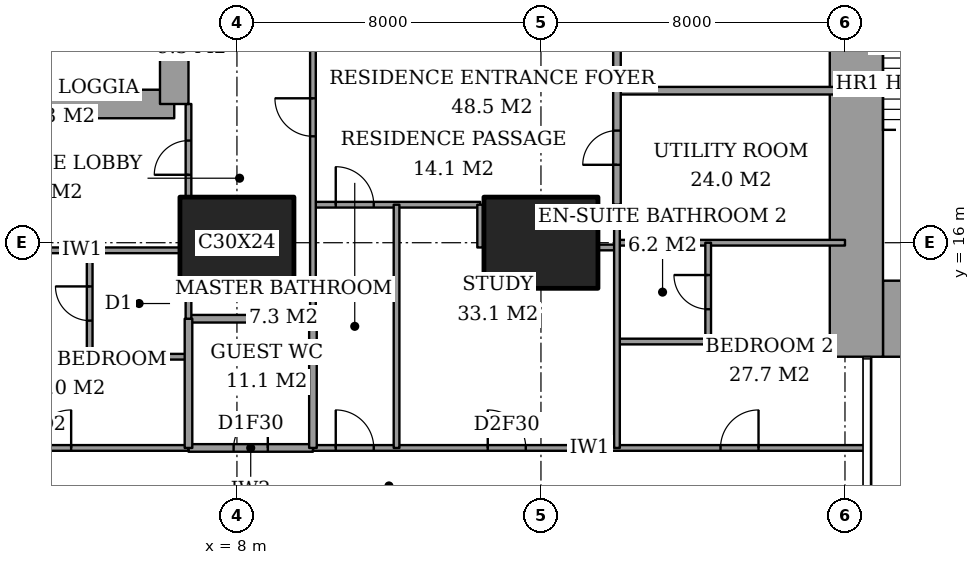
"""IFC4 building model, lengths in metres.
Left out: names, types, materials, properties, quantities, classifications, styles, units other than length and angle.
Written with IfcOpenShell. Run it as: python <this file> out.ifc"""

import sys

from ifc_helpers import new_model, si_unit, direction, frame, frame_2d, origin, origin_2d, place, context, subcontext, project, spatial, rectangle, extrude, element, fill, save


model = new_model("IFC4")
c1 = context("Model", 3, precision=1e-05, world=origin(), true_north=direction((0.0, 1.0)))
c2 = subcontext(c1, "Body", "Model", "MODEL_VIEW")
j1 = project(units=[si_unit("LENGTHUNIT", "METRE"), si_unit("PLANEANGLEUNIT", "RADIAN")], contexts=[c1])
p1 = place(None, origin())
s1 = spatial("IfcSite", under=j1, at=p1, CompositionType="ELEMENT")
p2 = place(p1, origin())
s2 = spatial("IfcBuilding", under=s1, at=p2, CompositionType="ELEMENT")
p3 = place(p2, frame((0.0, 0.0, 157.4)))
s3 = spatial("IfcBuildingStorey", under=s2, at=p3, CompositionType="ELEMENT", Elevation=157.4)
for number, where, z_axis, x_axis in (
    (1, (8.0, 16.0, 0.0), (0.0, 0.0, 1.0), (1.0, 0.0, 0.0)),
    (2, (16.0, 16.0, 0.0), (0.0, 0.0, 1.0), (1.0, 0.0, 0.0)),
):
    element("IfcColumn", number, at=place(p3, frame(where, z_axis=z_axis, x_axis=x_axis)), inside=s3, PredefinedType="COLUMN", context=c2, shape_type="SweptSolid", body=[
        extrude(rectangle(XDim=3.0, YDim=2.4, at=origin_2d()), origin(), (0.0, 0.0, 1.0), 3.6),
    ])
p4 = place(p3, frame((25.0, 14.0, 0.0), z_axis=(0.0, 0.0, 1.0), x_axis=(1.0, 0.0, 0.0)))
e3 = element("IfcWall", 3, at=p4, inside=s3, PredefinedType="SHEAR", context=c2, shape_type="SweptSolid", body=[
    extrude(rectangle(XDim=3.15, YDim=2.0, at=frame_2d((1.575, 0.0))), origin(), (0.0, 0.0, 1.0), 3.6),
])
p5 = place(p3, frame((24.3, 13.0, 0.0), z_axis=(0.0, 0.0, 1.0), x_axis=(0.0, 1.0, 0.0)))
e4 = element("IfcWall", 4, at=p5, inside=s3, PredefinedType="SHEAR", context=c2, shape_type="SweptSolid", body=[
    extrude(rectangle(XDim=10.15, YDim=1.4, at=frame_2d((5.075, 0.0))), origin(), (0.0, 0.0, 1.0), 3.6),
])
p6 = place(p3, frame((1.9, 19.65, 0.0), z_axis=(0.0, 0.0, 1.0), x_axis=(1.0, 0.0, 0.0)))
e5 = element("IfcWall", 5, at=p6, inside=s3, PredefinedType="SHEAR", context=c2, shape_type="SweptSolid", body=[
    extrude(rectangle(XDim=4.45, YDim=0.75, at=frame_2d((2.225, 0.0))), origin(), (0.0, 0.0, 1.0), 3.6),
])
p7 = place(p3, frame((6.35, 19.65, 0.0), z_axis=(0.0, 0.0, 1.0), x_axis=(0.0, 1.0, 0.0)))
e6 = element("IfcWall", 6, at=p7, inside=s3, PredefinedType="SHEAR", context=c2, shape_type="SweptSolid", body=[
    extrude(rectangle(XDim=8.7, YDim=0.75, at=frame_2d((4.35, 0.0))), origin(), (0.0, 0.0, 1.0), 3.6),
])
p8 = place(p7, frame((6.725, 0.0, 0.0)))
e7 = element("IfcOpeningElement", 7, at=p8, cuts=e6, PredefinedType="OPENING", context=c2, shape_type="SweptSolid", body=[
    extrude(rectangle(XDim=1.0, YDim=2.1, at=frame_2d((0.5, 1.05))), frame((0.0, 0.385, 0.0), z_axis=(0.0, -1.0, 0.0), x_axis=(1.0, 0.0, 0.0)), (0.0, 0.0, 1.0), 0.77),
])
p9 = place(p3, frame((6.725, 10.6, 0.0), z_axis=(0.0, 0.0, 1.0), x_axis=(1.0, 0.0, 0.0)))
e8 = element("IfcWall", 8, at=p9, inside=s3, PredefinedType="PARTITIONING", context=c2, shape_type="SweptSolid", body=[
    extrude(rectangle(XDim=3.275, YDim=0.2, at=frame_2d((1.637, 0.0))), origin(), (0.0, 0.0, 1.0), 3.35),
])
p10 = place(p9, frame((1.188, 0.0, 0.0)))
e9 = element("IfcOpeningElement", 9, at=p10, cuts=e8, PredefinedType="OPENING", context=c2, shape_type="SweptSolid", body=[
    extrude(rectangle(XDim=0.9, YDim=2.1, at=frame_2d((0.45, 1.05))), frame((0.0, 0.11, 0.0), z_axis=(0.0, -1.0, 0.0), x_axis=(1.0, 0.0, 0.0)), (0.0, 0.0, 1.0), 0.22),
])
p11 = place(p3, frame((-0.45, 10.6, 0.0), z_axis=(0.0, 0.0, 1.0), x_axis=(1.0, 0.0, 0.0)))
e10 = element("IfcWall", 10, at=p11, inside=s3, PredefinedType="PARTITIONING", context=c2, shape_type="SweptSolid", body=[
    extrude(rectangle(XDim=7.175, YDim=0.15, at=frame_2d((3.587, 0.0))), origin(), (0.0, 0.0, 1.0), 3.35),
])
p12 = place(p11, frame((3.087, 0.0, 0.0)))
e11 = element("IfcOpeningElement", 11, at=p12, cuts=e10, PredefinedType="OPENING", context=c2, shape_type="SweptSolid", body=[
    extrude(rectangle(XDim=1.0, YDim=2.1, at=frame_2d((0.5, 1.05))), frame((0.0, 0.085, 0.0), z_axis=(0.0, -1.0, 0.0), x_axis=(1.0, 0.0, 0.0)), (0.0, 0.0, 1.0), 0.17),
])
p13 = place(p3, frame((10.0, 10.6, 0.0), z_axis=(0.0, 0.0, 1.0), x_axis=(1.0, 0.0, 0.0)))
e12 = element("IfcWall", 12, at=p13, inside=s3, PredefinedType="PARTITIONING", context=c2, shape_type="SweptSolid", body=[
    extrude(rectangle(XDim=14.561, YDim=0.15, at=frame_2d((7.281, 0.0))), origin(), (0.0, 0.0, 1.0), 3.35),
])
p14 = place(p13, frame((0.6, 0.0, 0.0)))
e13 = element("IfcOpeningElement", 13, at=p14, cuts=e12, PredefinedType="OPENING", context=c2, shape_type="SweptSolid", body=[
    extrude(rectangle(XDim=1.0, YDim=2.1, at=frame_2d((0.5, 1.05))), frame((0.0, 0.085, 0.0), z_axis=(0.0, -1.0, 0.0), x_axis=(1.0, 0.0, 0.0)), (0.0, 0.0, 1.0), 0.17),
])
p15 = place(p13, frame((4.6, 0.0, 0.0)))
e14 = element("IfcOpeningElement", 14, at=p15, cuts=e12, PredefinedType="OPENING", context=c2, shape_type="SweptSolid", body=[
    extrude(rectangle(XDim=1.0, YDim=2.1, at=frame_2d((0.5, 1.05))), frame((0.0, 0.085, 0.0), z_axis=(0.0, -1.0, 0.0), x_axis=(1.0, 0.0, 0.0)), (0.0, 0.0, 1.0), 0.17),
])
p16 = place(p13, frame((10.725, 0.0, 0.0)))
e15 = element("IfcOpeningElement", 15, at=p16, cuts=e12, PredefinedType="OPENING", context=c2, shape_type="SweptSolid", body=[
    extrude(rectangle(XDim=1.0, YDim=2.1, at=frame_2d((0.5, 1.05))), frame((0.0, 0.085, 0.0), z_axis=(0.0, -1.0, 0.0), x_axis=(1.0, 0.0, 0.0)), (0.0, 0.0, 1.0), 0.17),
])
p17 = place(p3, frame((4.125, 13.0, 0.0), z_axis=(0.0, 0.0, 1.0), x_axis=(1.0, 0.0, 0.0)))
e16 = element("IfcWall", 16, at=p17, inside=s3, PredefinedType="PARTITIONING", context=c2, shape_type="SweptSolid", body=[
    extrude(rectangle(XDim=2.6, YDim=0.15, at=frame_2d((1.3, 0.0))), origin(), (0.0, 0.0, 1.0), 3.35),
])
p18 = place(p3, frame((18.0, 13.4, 0.0), z_axis=(0.0, 0.0, 1.0), x_axis=(1.0, 0.0, 0.0)))
e17 = element("IfcWall", 17, at=p18, inside=s3, PredefinedType="PARTITIONING", context=c2, shape_type="SweptSolid", body=[
    extrude(rectangle(XDim=2.4, YDim=0.15, at=frame_2d((1.2, 0.0))), origin(), (0.0, 0.0, 1.0), 3.35),
])
p19 = place(p3, frame((6.725, 14.0, 0.0), z_axis=(0.0, 0.0, 1.0), x_axis=(1.0, 0.0, 0.0)))
e18 = element("IfcWall", 18, at=p19, inside=s3, PredefinedType="PARTITIONING", context=c2, shape_type="SweptSolid", body=[
    extrude(rectangle(XDim=3.275, YDim=0.2, at=frame_2d((1.637, 0.0))), origin(), (0.0, 0.0, 1.0), 3.35),
])
p20 = place(p3, frame((1.35, 15.8, 0.0), z_axis=(0.0, 0.0, 1.0), x_axis=(1.0, 0.0, 0.0)))
e19 = element("IfcWall", 19, at=p20, inside=s3, PredefinedType="PARTITIONING", context=c2, shape_type="SweptSolid", body=[
    extrude(rectangle(XDim=5.15, YDim=0.15, at=frame_2d((2.575, 0.0))), origin(), (0.0, 0.0, 1.0), 3.35),
])
p21 = place(p3, frame((17.5, 15.875, 0.0), z_axis=(0.0, 0.0, 1.0), x_axis=(1.0, 0.0, 0.0)))
e20 = element("IfcWall", 20, at=p21, inside=s3, PredefinedType="PARTITIONING", context=c2, shape_type="SweptSolid", body=[
    extrude(rectangle(XDim=0.5, YDim=0.15, at=frame_2d((0.25, 0.0))), origin(), (0.0, 0.0, 1.0), 2.634),
])
p22 = place(p3, frame((18.0, 16.0, 0.0), z_axis=(0.0, 0.0, 1.0), x_axis=(1.0, 0.0, 0.0)))
e21 = element("IfcWall", 21, at=p22, inside=s3, PredefinedType="PARTITIONING", context=c2, shape_type="SweptSolid", body=[
    extrude(rectangle(XDim=6.0, YDim=0.15, at=frame_2d((3.0, 0.0))), origin(), (0.0, 0.0, 1.0), 2.634),
])
p23 = place(p3, frame((10.0, 17.0, 0.0), z_axis=(0.0, 0.0, 1.0), x_axis=(1.0, 0.0, 0.0)))
e22 = element("IfcWall", 22, at=p23, inside=s3, PredefinedType="PARTITIONING", context=c2, shape_type="SweptSolid", body=[
    extrude(rectangle(XDim=4.4, YDim=0.15, at=frame_2d((2.2, 0.0))), origin(), (0.0, 0.0, 1.0), 3.35),
])
p24 = place(p23, frame((0.6, 0.0, 0.0)))
e23 = element("IfcOpeningElement", 23, at=p24, cuts=e22, PredefinedType="OPENING", context=c2, shape_type="SweptSolid", body=[
    extrude(rectangle(XDim=1.0, YDim=2.1, at=frame_2d((0.5, 1.05))), frame((0.0, 0.085, 0.0), z_axis=(0.0, -1.0, 0.0), x_axis=(1.0, 0.0, 0.0)), (0.0, 0.0, 1.0), 0.17),
])
p25 = place(p3, frame((18.0, 20.0, 0.0), z_axis=(0.0, 0.0, 1.0), x_axis=(1.0, 0.0, 0.0)))
e24 = element("IfcWall", 24, at=p25, inside=s3, PredefinedType="PARTITIONING", context=c2, shape_type="SweptSolid", body=[
    extrude(rectangle(XDim=6.0, YDim=0.2, at=frame_2d((3.0, 0.0))), origin(), (0.0, 0.0, 1.0), 3.35),
])
p26 = place(p3, frame((4.125, 13.0, 0.0), z_axis=(0.0, 0.0, 1.0), x_axis=(0.0, 1.0, 0.0)))
e25 = element("IfcWall", 25, at=p26, inside=s3, PredefinedType="PARTITIONING", context=c2, shape_type="SweptSolid", body=[
    extrude(rectangle(XDim=2.8, YDim=0.15, at=frame_2d((1.4, 0.0))), origin(), (0.0, 0.0, 1.0), 3.35),
])
p27 = place(p26, frame((0.95, 0.0, 0.0)))
e26 = element("IfcOpeningElement", 26, at=p27, cuts=e25, PredefinedType="OPENING", context=c2, shape_type="SweptSolid", body=[
    extrude(rectangle(XDim=0.9, YDim=2.1, at=frame_2d((0.45, 1.05))), frame((0.0, 0.085, 0.0), z_axis=(0.0, -1.0, 0.0), x_axis=(1.0, 0.0, 0.0)), (0.0, 0.0, 1.0), 0.17),
])
p28 = place(p3, frame((6.725, 10.6, 0.0), z_axis=(0.0, 0.0, 1.0), x_axis=(0.0, 1.0, 0.0)))
e27 = element("IfcWall", 27, at=p28, inside=s3, PredefinedType="PARTITIONING", context=c2, shape_type="SweptSolid", body=[
    extrude(rectangle(XDim=3.4, YDim=0.2, at=frame_2d((1.7, 0.0))), origin(), (0.0, 0.0, 1.0), 3.35),
])
p29 = place(p3, frame((6.725, 14.0, 0.0), z_axis=(0.0, 0.0, 1.0), x_axis=(0.0, 1.0, 0.0)))
e28 = element("IfcWall", 28, at=p29, inside=s3, PredefinedType="PARTITIONING", context=c2, shape_type="SweptSolid", body=[
    extrude(rectangle(XDim=0.8, YDim=0.15, at=frame_2d((0.4, 0.0))), origin(), (0.0, 0.0, 1.0), 3.35),
])
p30 = place(p3, frame((6.725, 17.2, 0.0), z_axis=(0.0, 0.0, 1.0), x_axis=(0.0, 1.0, 0.0)))
e29 = element("IfcWall", 29, at=p30, inside=s3, PredefinedType="PARTITIONING", context=c2, shape_type="SweptSolid", body=[
    extrude(rectangle(XDim=2.45, YDim=0.15, at=frame_2d((1.225, 0.0))), origin(), (0.0, 0.0, 1.0), 3.35),
])
p31 = place(p30, frame((0.587, 0.0, 0.0)))
e30 = element("IfcOpeningElement", 30, at=p31, cuts=e29, PredefinedType="OPENING", context=c2, shape_type="SweptSolid", body=[
    extrude(rectangle(XDim=0.9, YDim=2.1, at=frame_2d((0.45, 1.05))), frame((0.0, 0.085, 0.0), z_axis=(0.0, -1.0, 0.0), x_axis=(1.0, 0.0, 0.0)), (0.0, 0.0, 1.0), 0.17),
])
p32 = place(p3, frame((10.0, 10.6, 0.0), z_axis=(0.0, 0.0, 1.0), x_axis=(0.0, 1.0, 0.0)))
e31 = element("IfcWall", 31, at=p32, inside=s3, PredefinedType="PARTITIONING", context=c2, shape_type="SweptSolid", body=[
    extrude(rectangle(XDim=3.4, YDim=0.2, at=frame_2d((1.7, 0.0))), origin(), (0.0, 0.0, 1.0), 3.35),
])
p33 = place(p3, frame((10.0, 14.0, 0.0), z_axis=(0.0, 0.0, 1.0), x_axis=(0.0, 1.0, 0.0)))
e32 = element("IfcWall", 32, at=p33, inside=s3, PredefinedType="PARTITIONING", context=c2, shape_type="SweptSolid", body=[
    extrude(rectangle(XDim=7.6, YDim=0.15, at=frame_2d((3.8, 0.0))), origin(), (0.0, 0.0, 1.0), 3.35),
])
p34 = place(p33, frame((4.8, 0.0, 0.0)))
e33 = element("IfcOpeningElement", 33, at=p34, cuts=e32, PredefinedType="OPENING", context=c2, shape_type="SweptSolid", body=[
    extrude(rectangle(XDim=1.0, YDim=2.1, at=frame_2d((0.5, 1.05))), frame((0.0, 0.085, 0.0), z_axis=(0.0, -1.0, 0.0), x_axis=(1.0, 0.0, 0.0)), (0.0, 0.0, 1.0), 0.17),
])
p35 = place(p3, frame((12.2, 10.6, 0.0), z_axis=(0.0, 0.0, 1.0), x_axis=(0.0, 1.0, 0.0)))
e34 = element("IfcWall", 34, at=p35, inside=s3, PredefinedType="PARTITIONING", context=c2, shape_type="SweptSolid", body=[
    extrude(rectangle(XDim=6.4, YDim=0.15, at=frame_2d((3.2, 0.0))), origin(), (0.0, 0.0, 1.0), 3.35),
])
p36 = place(p3, frame((14.4, 15.875, 0.0), z_axis=(0.0, 0.0, 1.0), x_axis=(0.0, 1.0, 0.0)))
e35 = element("IfcWall", 35, at=p36, inside=s3, PredefinedType="PARTITIONING", context=c2, shape_type="SweptSolid", body=[
    extrude(rectangle(XDim=1.125, YDim=0.15, at=frame_2d((0.562, 0.0))), origin(), (0.0, 0.0, 1.0), 3.35),
])
p37 = place(p3, frame((18.0, 17.0, 0.0), z_axis=(0.0, 0.0, 1.0), x_axis=(0.0, 1.0, 0.0)))
e36 = element("IfcWall", 36, at=p37, inside=s3, PredefinedType="PARTITIONING", context=c2, shape_type="SweptSolid", body=[
    extrude(rectangle(XDim=7.0, YDim=0.2, at=frame_2d((3.5, 0.0))), origin(), (0.0, 0.0, 1.0), 3.35),
])
p38 = place(p37, frame((4.4, 0.0, 0.0)))
e37 = element("IfcOpeningElement", 37, at=p38, cuts=e36, PredefinedType="OPENING", context=c2, shape_type="SweptSolid", body=[
    extrude(rectangle(XDim=1.2, YDim=2.4, at=frame_2d((0.6, 1.2))), frame((0.0, 0.11, 0.0), z_axis=(0.0, -1.0, 0.0), x_axis=(1.0, 0.0, 0.0)), (0.0, 0.0, 1.0), 0.22),
])
p39 = place(p37, frame((1.05, 0.0, 0.0)))
e38 = element("IfcOpeningElement", 38, at=p39, cuts=e36, PredefinedType="OPENING", context=c2, shape_type="SweptSolid", body=[
    extrude(rectangle(XDim=0.9, YDim=2.1, at=frame_2d((0.45, 1.05))), frame((0.0, 0.11, 0.0), z_axis=(0.0, -1.0, 0.0), x_axis=(1.0, 0.0, 0.0)), (0.0, 0.0, 1.0), 0.22),
])
p40 = place(p3, frame((18.0, 10.6, 0.0), z_axis=(0.0, 0.0, 1.0), x_axis=(0.0, 1.0, 0.0)))
e39 = element("IfcWall", 39, at=p40, inside=s3, PredefinedType="PARTITIONING", context=c2, shape_type="SweptSolid", body=[
    extrude(rectangle(XDim=6.4, YDim=0.15, at=frame_2d((3.2, 0.0))), origin(), (0.0, 0.0, 1.0), 3.35),
])
p41 = place(p3, frame((20.4, 13.4, 0.0), z_axis=(0.0, 0.0, 1.0), x_axis=(0.0, 1.0, 0.0)))
e40 = element("IfcWall", 40, at=p41, inside=s3, PredefinedType="PARTITIONING", context=c2, shape_type="SweptSolid", body=[
    extrude(rectangle(XDim=2.6, YDim=0.15, at=frame_2d((1.3, 0.0))), origin(), (0.0, 0.0, 1.0), 3.35),
])
p42 = place(p41, frame((0.85, 0.0, 0.0)))
e41 = element("IfcOpeningElement", 41, at=p42, cuts=e40, PredefinedType="OPENING", context=c2, shape_type="SweptSolid", body=[
    extrude(rectangle(XDim=0.9, YDim=2.1, at=frame_2d((0.45, 1.05))), frame((0.0, 0.085, 0.0), z_axis=(0.0, -1.0, 0.0), x_axis=(1.0, 0.0, 0.0)), (0.0, 0.0, 1.0), 0.17),
])
p43 = place(p14, origin())
e42 = element("IfcDoor", 42, at=p43, inside=s3, OperationType="SINGLE_SWING_RIGHT", PredefinedType="DOOR", context=c2, shape_type="SweptSolid", body=[
    extrude(rectangle(XDim=1.0, YDim=2.1, at=frame_2d((0.5, 1.05))), frame((0.0, 0.025, 0.0), z_axis=(0.0, -1.0, 0.0), x_axis=(1.0, 0.0, 0.0)), (0.0, 0.0, 1.0), 0.05),
])
fill(e13, e42)
p44 = place(p27, origin())
e43 = element("IfcDoor", 43, at=p44, inside=s3, OperationType="SINGLE_SWING_LEFT", PredefinedType="DOOR", context=c2, shape_type="SweptSolid", body=[
    extrude(rectangle(XDim=0.9, YDim=2.1, at=frame_2d((0.45, 1.05))), frame((0.0, 0.025, 0.0), z_axis=(0.0, -1.0, 0.0), x_axis=(1.0, 0.0, 0.0)), (0.0, 0.0, 1.0), 0.05),
])
fill(e26, e43)
p45 = place(p12, origin())
e44 = element("IfcDoor", 44, at=p45, inside=s3, OperationType="SINGLE_SWING_LEFT", PredefinedType="DOOR", context=c2, shape_type="SweptSolid", body=[
    extrude(rectangle(XDim=1.0, YDim=2.1, at=frame_2d((0.5, 1.05))), frame((0.0, 0.025, 0.0), z_axis=(0.0, -1.0, 0.0), x_axis=(1.0, 0.0, 0.0)), (0.0, 0.0, 1.0), 0.05),
])
fill(e11, e44)
p46 = place(p31, origin())
e45 = element("IfcDoor", 45, at=p46, inside=s3, OperationType="SINGLE_SWING_RIGHT", PredefinedType="DOOR", context=c2, shape_type="SweptSolid", body=[
    extrude(rectangle(XDim=0.9, YDim=2.1, at=frame_2d((0.45, 1.05))), frame((0.0, 0.025, 0.0), z_axis=(0.0, -1.0, 0.0), x_axis=(1.0, 0.0, 0.0)), (0.0, 0.0, 1.0), 0.05),
])
fill(e30, e45)
p47 = place(p10, origin())
e46 = element("IfcDoor", 46, at=p47, inside=s3, OperationType="SINGLE_SWING_LEFT", PredefinedType="DOOR", context=c2, shape_type="SweptSolid", body=[
    extrude(rectangle(XDim=0.9, YDim=2.1, at=frame_2d((0.45, 1.05))), frame((0.0, 0.025, 0.0), z_axis=(0.0, -1.0, 0.0), x_axis=(1.0, 0.0, 0.0)), (0.0, 0.0, 1.0), 0.05),
])
fill(e9, e46)
p48 = place(p34, origin())
e47 = element("IfcDoor", 47, at=p48, inside=s3, OperationType="SINGLE_SWING_LEFT", PredefinedType="DOOR", context=c2, shape_type="SweptSolid", body=[
    extrude(rectangle(XDim=1.0, YDim=2.1, at=frame_2d((0.5, 1.05))), frame((0.0, 0.025, 0.0), z_axis=(0.0, -1.0, 0.0), x_axis=(1.0, 0.0, 0.0)), (0.0, 0.0, 1.0), 0.05),
])
fill(e33, e47)
p49 = place(p24, origin())
e48 = element("IfcDoor", 48, at=p49, inside=s3, OperationType="SINGLE_SWING_RIGHT", PredefinedType="DOOR", context=c2, shape_type="SweptSolid", body=[
    extrude(rectangle(XDim=1.0, YDim=2.1, at=frame_2d((0.5, 1.05))), frame((0.0, 0.025, 0.0), z_axis=(0.0, -1.0, 0.0), x_axis=(1.0, 0.0, 0.0)), (0.0, 0.0, 1.0), 0.05),
])
fill(e23, e48)
p50 = place(p15, origin())
e49 = element("IfcDoor", 49, at=p50, inside=s3, OperationType="SINGLE_SWING_RIGHT", PredefinedType="DOOR", context=c2, shape_type="SweptSolid", body=[
    extrude(rectangle(XDim=1.0, YDim=2.1, at=frame_2d((0.5, 1.05))), frame((0.0, 0.025, 0.0), z_axis=(0.0, -1.0, 0.0), x_axis=(1.0, 0.0, 0.0)), (0.0, 0.0, 1.0), 0.05),
])
fill(e14, e49)
p51 = place(p42, origin())
e50 = element("IfcDoor", 50, at=p51, inside=s3, OperationType="SINGLE_SWING_LEFT", PredefinedType="DOOR", context=c2, shape_type="SweptSolid", body=[
    extrude(rectangle(XDim=0.9, YDim=2.1, at=frame_2d((0.45, 1.05))), frame((0.0, 0.025, 0.0), z_axis=(0.0, -1.0, 0.0), x_axis=(1.0, 0.0, 0.0)), (0.0, 0.0, 1.0), 0.05),
])
fill(e41, e50)
p52 = place(p16, origin())
e51 = element("IfcDoor", 51, at=p52, inside=s3, OperationType="SINGLE_SWING_LEFT", PredefinedType="DOOR", context=c2, shape_type="SweptSolid", body=[
    extrude(rectangle(XDim=1.0, YDim=2.1, at=frame_2d((0.5, 1.05))), frame((0.0, 0.025, 0.0), z_axis=(0.0, -1.0, 0.0), x_axis=(1.0, 0.0, 0.0)), (0.0, 0.0, 1.0), 0.05),
])
fill(e15, e51)
p53 = place(p39, origin())
e52 = element("IfcDoor", 52, at=p53, inside=s3, OperationType="SINGLE_SWING_RIGHT", PredefinedType="DOOR", context=c2, shape_type="SweptSolid", body=[
    extrude(rectangle(XDim=0.9, YDim=2.1, at=frame_2d((0.45, 1.05))), frame((0.0, 0.025, 0.0), z_axis=(0.0, -1.0, 0.0), x_axis=(1.0, 0.0, 0.0)), (0.0, 0.0, 1.0), 0.05),
])
fill(e38, e52)
save(model, sys.argv[1])
